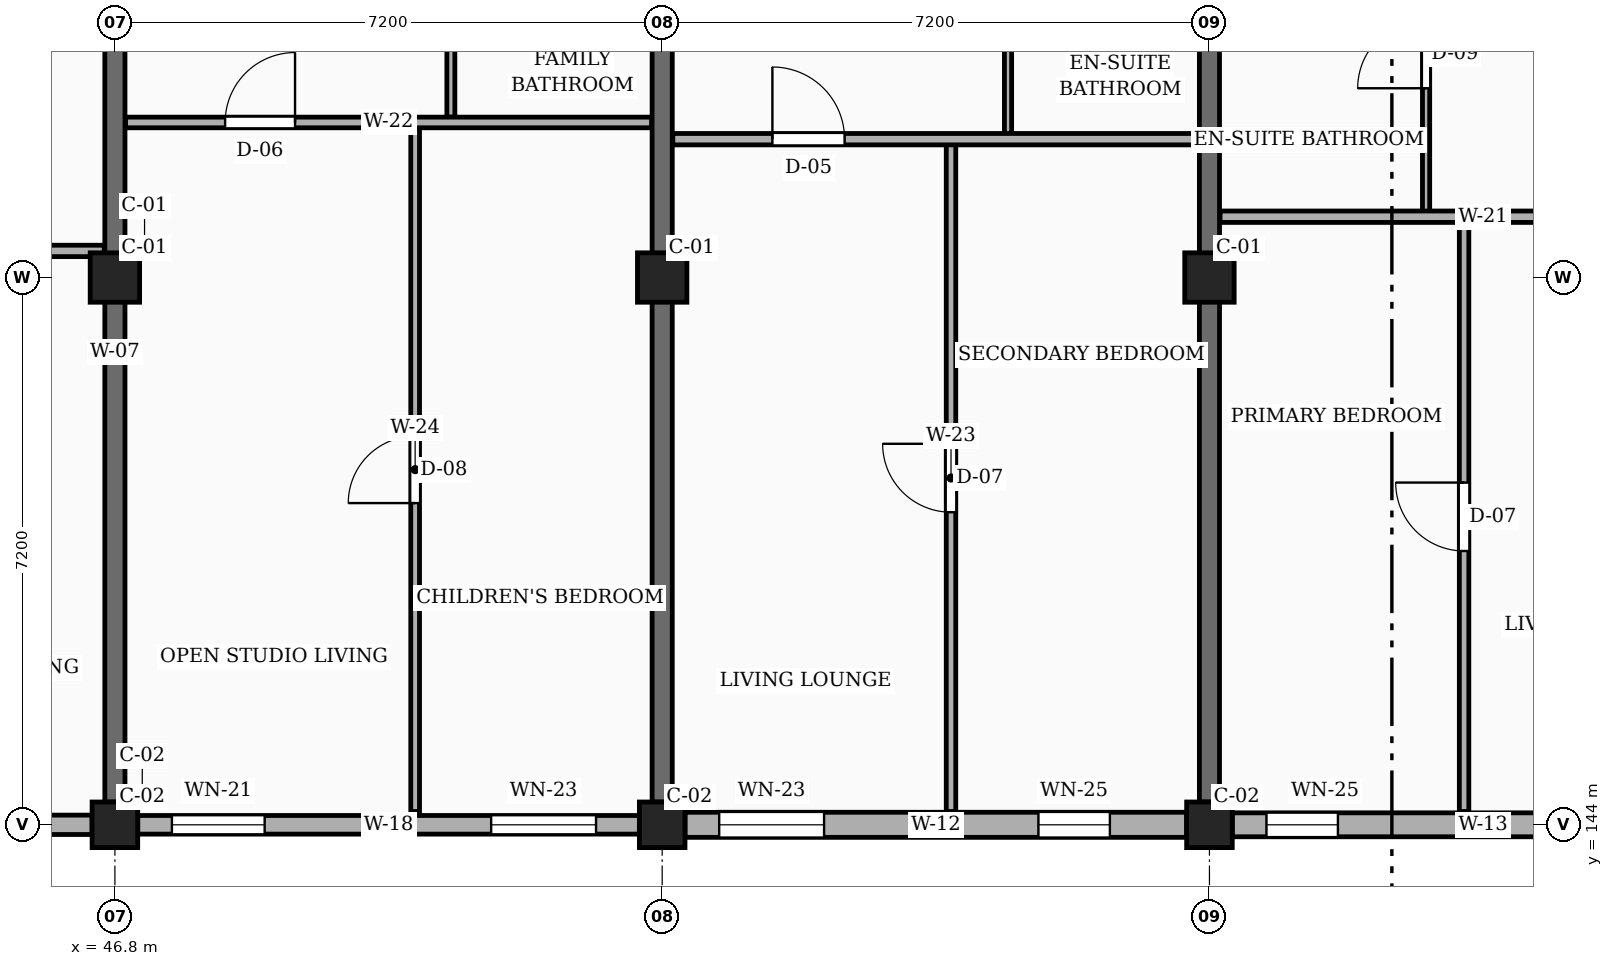
"""IFC4 building model, lengths in metres.
Left out: names, types, materials, properties, quantities, classifications, styles, units other than length and angle.
Written with IfcOpenShell. Run it as: python <this file> out.ifc"""

import sys

from ifc_helpers import new_model, si_unit, direction, frame, frame_2d, origin, origin_2d, place, context, subcontext, project, spatial, rectangle, extrude, element, fill, save


model = new_model("IFC4")
c1 = context("Model", 3, precision=1e-05, world=origin(), true_north=direction((0.0, 1.0)))
c2 = subcontext(c1, "Body", "Model", "MODEL_VIEW")
j1 = project(units=[si_unit("LENGTHUNIT", "METRE"), si_unit("PLANEANGLEUNIT", "RADIAN")], contexts=[c1])
p1 = place(None, origin())
s1 = spatial("IfcSite", under=j1, at=p1, CompositionType="ELEMENT")
p2 = place(p1, origin())
s2 = spatial("IfcBuilding", under=s1, at=p2, CompositionType="ELEMENT")
p3 = place(p2, frame((0.0, 0.0, 4.5)))
s3 = spatial("IfcBuildingStorey", under=s2, at=p3, CompositionType="ELEMENT", Elevation=4.5)
p4 = place(p3, frame((46.8, 144.0, 0.0), z_axis=(0.0, 0.0, 1.0), x_axis=(1.0, 0.0, 0.0)))
e1 = element("IfcColumn", 1, at=p4, inside=s3, PredefinedType="COLUMN", context=c2, shape_type="SweptSolid", body=[
    extrude(rectangle(XDim=0.6, YDim=0.6, at=origin_2d()), origin(), (0.0, 0.0, 1.0), 3.15),
])
p5 = place(p3, frame((46.8, 151.2, 0.0), z_axis=(0.0, 0.0, 1.0), x_axis=(1.0, 0.0, 0.0)))
e2 = element("IfcColumn", 2, at=p5, inside=s3, PredefinedType="COLUMN", context=c2, shape_type="SweptSolid", body=[
    extrude(rectangle(XDim=0.65, YDim=0.65, at=origin_2d()), origin(), (0.0, 0.0, 1.0), 3.15),
])
p6 = place(p3, frame((54.0, 144.0, 0.0), z_axis=(0.0, 0.0, 1.0), x_axis=(1.0, 0.0, 0.0)))
e3 = element("IfcColumn", 3, at=p6, inside=s3, PredefinedType="COLUMN", context=c2, shape_type="SweptSolid", body=[
    extrude(rectangle(XDim=0.6, YDim=0.6, at=origin_2d()), origin(), (0.0, 0.0, 1.0), 3.15),
])
p7 = place(p3, frame((54.0, 151.2, 0.0), z_axis=(0.0, 0.0, 1.0), x_axis=(1.0, 0.0, 0.0)))
e4 = element("IfcColumn", 4, at=p7, inside=s3, PredefinedType="COLUMN", context=c2, shape_type="SweptSolid", body=[
    extrude(rectangle(XDim=0.65, YDim=0.65, at=origin_2d()), origin(), (0.0, 0.0, 1.0), 3.15),
])
p8 = place(p3, frame((61.2, 144.0, 0.0), z_axis=(0.0, 0.0, 1.0), x_axis=(1.0, 0.0, 0.0)))
e5 = element("IfcColumn", 5, at=p8, inside=s3, PredefinedType="COLUMN", context=c2, shape_type="SweptSolid", body=[
    extrude(rectangle(XDim=0.6, YDim=0.6, at=origin_2d()), origin(), (0.0, 0.0, 1.0), 3.15),
])
p9 = place(p3, frame((61.2, 151.2, 0.0), z_axis=(0.0, 0.0, 1.0), x_axis=(1.0, 0.0, 0.0)))
e6 = element("IfcColumn", 6, at=p9, inside=s3, PredefinedType="COLUMN", context=c2, shape_type="SweptSolid", body=[
    extrude(rectangle(XDim=0.65, YDim=0.65, at=origin_2d()), origin(), (0.0, 0.0, 1.0), 3.15),
])
for number, where, z_axis, x_axis in (
    (7, (46.8, 144.3, 0.0), (0.0, 0.0, 1.0), (0.0, 1.0, 0.0)),
    (8, (54.0, 144.3, 0.0), (0.0, 0.0, 1.0), (0.0, 1.0, 0.0)),
    (9, (61.2, 144.3, 0.0), (0.0, 0.0, 1.0), (0.0, 1.0, 0.0)),
):
    element("IfcWall", number, at=place(p3, frame(where, z_axis=z_axis, x_axis=x_axis)), inside=s3, PredefinedType="SOLIDWALL", context=c2, shape_type="SweptSolid", body=[
        extrude(rectangle(XDim=11.85, YDim=0.265, at=frame_2d((5.925, 0.0))), origin(), (0.0, 0.0, 1.0), 2.185),
    ])
p10 = place(p3, frame((39.9, 144.0, 0.0), z_axis=(0.0, 0.0, 1.0), x_axis=(1.0, 0.0, 0.0)))
e10 = element("IfcWall", 10, at=p10, inside=s3, PredefinedType="SOLIDWALL", context=c2, shape_type="SweptSolid", body=[
    extrude(rectangle(XDim=6.6, YDim=0.255, at=frame_2d((3.3, 0.0))), origin(), (0.0, 0.0, 1.0), 2.455),
])
p11 = place(p10, frame((0.45, 0.0, 0.78)))
e11 = element("IfcOpeningElement", 11, at=p11, cuts=e10, PredefinedType="OPENING", context=c2, shape_type="SweptSolid", body=[
    extrude(rectangle(XDim=1.06, YDim=1.36, at=frame_2d((0.53, 0.68))), frame((0.0, 0.137, 0.0), z_axis=(0.0, -1.0, 0.0), x_axis=(1.0, 0.0, 0.0)), (0.0, 0.0, 1.0), 0.275),
])
p12 = place(p10, frame((4.65, 0.0, 0.78)))
e12 = element("IfcOpeningElement", 12, at=p12, cuts=e10, PredefinedType="OPENING", context=c2, shape_type="SweptSolid", body=[
    extrude(rectangle(XDim=1.22, YDim=1.36, at=frame_2d((0.61, 0.68))), frame((0.0, 0.137, 0.0), z_axis=(0.0, -1.0, 0.0), x_axis=(1.0, 0.0, 0.0)), (0.0, 0.0, 1.0), 0.275),
])
p13 = place(p3, frame((47.1, 144.0, 0.0), z_axis=(0.0, 0.0, 1.0), x_axis=(1.0, 0.0, 0.0)))
e13 = element("IfcWall", 13, at=p13, inside=s3, PredefinedType="SOLIDWALL", context=c2, shape_type="SweptSolid", body=[
    extrude(rectangle(XDim=6.6, YDim=0.245, at=frame_2d((3.3, 0.0))), origin(), (0.0, 0.0, 1.0), 2.455),
])
p14 = place(p13, frame((0.45, 0.0, 0.78)))
e14 = element("IfcOpeningElement", 14, at=p14, cuts=e13, PredefinedType="OPENING", context=c2, shape_type="SweptSolid", body=[
    extrude(rectangle(XDim=1.22, YDim=1.36, at=frame_2d((0.61, 0.68))), frame((0.0, 0.133, 0.0), z_axis=(0.0, -1.0, 0.0), x_axis=(1.0, 0.0, 0.0)), (0.0, 0.0, 1.0), 0.265),
])
p15 = place(p13, frame((4.65, 0.0, 0.78)))
e15 = element("IfcOpeningElement", 15, at=p15, cuts=e13, PredefinedType="OPENING", context=c2, shape_type="SweptSolid", body=[
    extrude(rectangle(XDim=1.38, YDim=1.36, at=frame_2d((0.69, 0.68))), frame((0.0, 0.133, 0.0), z_axis=(0.0, -1.0, 0.0), x_axis=(1.0, 0.0, 0.0)), (0.0, 0.0, 1.0), 0.265),
])
p16 = place(p3, frame((54.3, 144.0, 0.0), z_axis=(0.0, 0.0, 1.0), x_axis=(1.0, 0.0, 0.0)))
e16 = element("IfcWall", 16, at=p16, inside=s3, PredefinedType="SOLIDWALL", context=c2, shape_type="SweptSolid", body=[
    extrude(rectangle(XDim=6.6, YDim=0.33, at=frame_2d((3.3, 0.0))), origin(), (0.0, 0.0, 1.0), 2.455),
])
p17 = place(p16, frame((0.45, 0.0, 0.78)))
e17 = element("IfcOpeningElement", 17, at=p17, cuts=e16, PredefinedType="OPENING", context=c2, shape_type="SweptSolid", body=[
    extrude(rectangle(XDim=1.38, YDim=1.36, at=frame_2d((0.69, 0.68))), frame((0.0, 0.175, 0.0), z_axis=(0.0, -1.0, 0.0), x_axis=(1.0, 0.0, 0.0)), (0.0, 0.0, 1.0), 0.35),
])
p18 = place(p16, frame((4.65, 0.0, 0.78)))
e18 = element("IfcOpeningElement", 18, at=p18, cuts=e16, PredefinedType="OPENING", context=c2, shape_type="SweptSolid", body=[
    extrude(rectangle(XDim=0.94, YDim=1.44, at=frame_2d((0.47, 0.72))), frame((0.0, 0.175, 0.0), z_axis=(0.0, -1.0, 0.0), x_axis=(1.0, 0.0, 0.0)), (0.0, 0.0, 1.0), 0.35),
])
p19 = place(p3, frame((61.5, 144.0, 0.0), z_axis=(0.0, 0.0, 1.0), x_axis=(1.0, 0.0, 0.0)))
e19 = element("IfcWall", 19, at=p19, inside=s3, PredefinedType="SOLIDWALL", context=c2, shape_type="SweptSolid", body=[
    extrude(rectangle(XDim=6.6, YDim=0.315, at=frame_2d((3.3, 0.0))), origin(), (0.0, 0.0, 1.0), 2.455),
])
p20 = place(p19, frame((0.45, 0.0, 0.78)))
e20 = element("IfcOpeningElement", 20, at=p20, cuts=e19, PredefinedType="OPENING", context=c2, shape_type="SweptSolid", body=[
    extrude(rectangle(XDim=0.94, YDim=1.44, at=frame_2d((0.47, 0.72))), frame((0.0, 0.167, 0.0), z_axis=(0.0, -1.0, 0.0), x_axis=(1.0, 0.0, 0.0)), (0.0, 0.0, 1.0), 0.335),
])
p21 = place(p19, frame((4.65, 0.0, 0.78)))
e21 = element("IfcOpeningElement", 21, at=p21, cuts=e19, PredefinedType="OPENING", context=c2, shape_type="SweptSolid", body=[
    extrude(rectangle(XDim=1.15, YDim=1.44, at=frame_2d((0.575, 0.72))), frame((0.0, 0.167, 0.0), z_axis=(0.0, -1.0, 0.0), x_axis=(1.0, 0.0, 0.0)), (0.0, 0.0, 1.0), 0.335),
])
p22 = place(p3, frame((39.74, 151.55, 0.0), z_axis=(0.0, 0.0, 1.0), x_axis=(1.0, 0.0, 0.0)))
e22 = element("IfcWall", 22, at=p22, inside=s3, PredefinedType="PARTITIONING", context=c2, shape_type="SweptSolid", body=[
    extrude(rectangle(XDim=6.92, YDim=0.15, at=frame_2d((3.46, 0.0))), origin(), (0.0, 0.0, 1.0), 2.32),
])
p23 = place(p22, frame((4.66, 0.0, 0.0)))
e23 = element("IfcOpeningElement", 23, at=p23, cuts=e22, PredefinedType="OPENING", context=c2, shape_type="SweptSolid", body=[
    extrude(rectangle(XDim=0.95, YDim=2.1, at=frame_2d((0.475, 1.05))), frame((0.0, 0.085, 0.0), z_axis=(0.0, -1.0, 0.0), x_axis=(1.0, 0.0, 0.0)), (0.0, 0.0, 1.0), 0.17),
])
p24 = place(p3, frame((50.75, 144.175, 0.0), z_axis=(0.0, 0.0, 1.0), x_axis=(0.0, 1.0, 0.0)))
e24 = element("IfcWall", 24, at=p24, inside=s3, PredefinedType="PARTITIONING", context=c2, shape_type="SweptSolid", body=[
    extrude(rectangle(XDim=8.995, YDim=0.115, at=frame_2d((4.498, 0.0))), origin(), (0.0, 0.0, 1.0), 2.32),
])
p25 = place(p24, frame((4.058, 0.0, 0.0)))
e25 = element("IfcOpeningElement", 25, at=p25, cuts=e24, PredefinedType="OPENING", context=c2, shape_type="SweptSolid", body=[
    extrude(rectangle(XDim=0.88, YDim=2.08, at=frame_2d((0.44, 1.04))), frame((0.0, 0.067, 0.0), z_axis=(0.0, -1.0, 0.0), x_axis=(1.0, 0.0, 0.0)), (0.0, 0.0, 1.0), 0.135),
])
p26 = place(p3, frame((51.22, 153.31, 0.0), z_axis=(0.0, 0.0, 1.0), x_axis=(0.0, 1.0, 0.0)))
e26 = element("IfcWall", 26, at=p26, inside=s3, PredefinedType="PARTITIONING", context=c2, shape_type="SweptSolid", body=[
    extrude(rectangle(XDim=2.9, YDim=0.105, at=frame_2d((1.45, 0.0))), origin(), (0.0, 0.0, 1.0), 2.32),
])
p27 = place(p26, frame((1.015, 0.0, 0.0)))
e27 = element("IfcOpeningElement", 27, at=p27, cuts=e26, PredefinedType="OPENING", context=c2, shape_type="SweptSolid", body=[
    extrude(rectangle(XDim=0.87, YDim=2.05, at=frame_2d((0.435, 1.025))), frame((0.0, 0.062, 0.0), z_axis=(0.0, -1.0, 0.0), x_axis=(1.0, 0.0, 0.0)), (0.0, 0.0, 1.0), 0.125),
])
p28 = place(p3, frame((46.94, 153.24, 0.0), z_axis=(0.0, 0.0, 1.0), x_axis=(1.0, 0.0, 0.0)))
e28 = element("IfcWall", 28, at=p28, inside=s3, PredefinedType="PARTITIONING", context=c2, shape_type="SweptSolid", body=[
    extrude(rectangle(XDim=6.92, YDim=0.14, at=frame_2d((3.46, 0.0))), origin(), (0.0, 0.0, 1.0), 2.32),
])
p29 = place(p28, frame((1.31, 0.0, 0.0)))
e29 = element("IfcOpeningElement", 29, at=p29, cuts=e28, PredefinedType="OPENING", context=c2, shape_type="SweptSolid", body=[
    extrude(rectangle(XDim=0.92, YDim=2.1, at=frame_2d((0.46, 1.05))), frame((0.0, 0.08, 0.0), z_axis=(0.0, -1.0, 0.0), x_axis=(1.0, 0.0, 0.0)), (0.0, 0.0, 1.0), 0.16),
])
p30 = place(p3, frame((57.8, 144.175, 0.0), z_axis=(0.0, 0.0, 1.0), x_axis=(0.0, 1.0, 0.0)))
e30 = element("IfcWall", 30, at=p30, inside=s3, PredefinedType="PARTITIONING", context=c2, shape_type="SweptSolid", body=[
    extrude(rectangle(XDim=8.775, YDim=0.125, at=frame_2d((4.387, 0.0))), origin(), (0.0, 0.0, 1.0), 2.32),
])
p31 = place(p30, frame((3.938, 0.0, 0.0)))
e31 = element("IfcOpeningElement", 31, at=p31, cuts=e30, PredefinedType="OPENING", context=c2, shape_type="SweptSolid", body=[
    extrude(rectangle(XDim=0.9, YDim=2.1, at=frame_2d((0.45, 1.05))), frame((0.0, 0.073, 0.0), z_axis=(0.0, -1.0, 0.0), x_axis=(1.0, 0.0, 0.0)), (0.0, 0.0, 1.0), 0.145),
])
p32 = place(p3, frame((58.55, 153.09, 0.0), z_axis=(0.0, 0.0, 1.0), x_axis=(0.0, 1.0, 0.0)))
e32 = element("IfcWall", 32, at=p32, inside=s3, PredefinedType="PARTITIONING", context=c2, shape_type="SweptSolid", body=[
    extrude(rectangle(XDim=3.12, YDim=0.095, at=frame_2d((1.56, 0.0))), origin(), (0.0, 0.0, 1.0), 2.32),
])
p33 = place(p32, frame((1.11, 0.0, 0.0)))
e33 = element("IfcOpeningElement", 33, at=p33, cuts=e32, PredefinedType="OPENING", context=c2, shape_type="SweptSolid", body=[
    extrude(rectangle(XDim=0.9, YDim=2.05, at=frame_2d((0.45, 1.025))), frame((0.0, 0.058, 0.0), z_axis=(0.0, -1.0, 0.0), x_axis=(1.0, 0.0, 0.0)), (0.0, 0.0, 1.0), 0.115),
])
p34 = place(p3, frame((54.14, 153.02, 0.0), z_axis=(0.0, 0.0, 1.0), x_axis=(1.0, 0.0, 0.0)))
e34 = element("IfcWall", 34, at=p34, inside=s3, PredefinedType="PARTITIONING", context=c2, shape_type="SweptSolid", body=[
    extrude(rectangle(XDim=6.92, YDim=0.15, at=frame_2d((3.46, 0.0))), origin(), (0.0, 0.0, 1.0), 2.32),
])
p35 = place(p34, frame((1.31, 0.0, 0.0)))
e35 = element("IfcOpeningElement", 35, at=p35, cuts=e34, PredefinedType="OPENING", context=c2, shape_type="SweptSolid", body=[
    extrude(rectangle(XDim=0.95, YDim=2.1, at=frame_2d((0.475, 1.05))), frame((0.0, 0.085, 0.0), z_axis=(0.0, -1.0, 0.0), x_axis=(1.0, 0.0, 0.0)), (0.0, 0.0, 1.0), 0.17),
])
p36 = place(p3, frame((64.55, 144.175, 0.0), z_axis=(0.0, 0.0, 1.0), x_axis=(0.0, 1.0, 0.0)))
e36 = element("IfcWall", 36, at=p36, inside=s3, PredefinedType="PARTITIONING", context=c2, shape_type="SweptSolid", body=[
    extrude(rectangle(XDim=7.755, YDim=0.125, at=frame_2d((3.877, 0.0))), origin(), (0.0, 0.0, 1.0), 2.32),
])
p37 = place(p36, frame((3.427, 0.0, 0.0)))
e37 = element("IfcOpeningElement", 37, at=p37, cuts=e36, PredefinedType="OPENING", context=c2, shape_type="SweptSolid", body=[
    extrude(rectangle(XDim=0.9, YDim=2.1, at=frame_2d((0.45, 1.05))), frame((0.0, 0.073, 0.0), z_axis=(0.0, -1.0, 0.0), x_axis=(1.0, 0.0, 0.0)), (0.0, 0.0, 1.0), 0.145),
])
p38 = place(p3, frame((64.05, 152.07, 0.0), z_axis=(0.0, 0.0, 1.0), x_axis=(0.0, 1.0, 0.0)))
e38 = element("IfcWall", 38, at=p38, inside=s3, PredefinedType="PARTITIONING", context=c2, shape_type="SweptSolid", body=[
    extrude(rectangle(XDim=4.14, YDim=0.095, at=frame_2d((2.07, 0.0))), origin(), (0.0, 0.0, 1.0), 2.32),
])
p39 = place(p38, frame((1.62, 0.0, 0.0)))
e39 = element("IfcOpeningElement", 39, at=p39, cuts=e38, PredefinedType="OPENING", context=c2, shape_type="SweptSolid", body=[
    extrude(rectangle(XDim=0.9, YDim=2.05, at=frame_2d((0.45, 1.025))), frame((0.0, 0.058, 0.0), z_axis=(0.0, -1.0, 0.0), x_axis=(1.0, 0.0, 0.0)), (0.0, 0.0, 1.0), 0.115),
])
p40 = place(p3, frame((61.34, 152.0, 0.0), z_axis=(0.0, 0.0, 1.0), x_axis=(1.0, 0.0, 0.0)))
e40 = element("IfcWall", 40, at=p40, inside=s3, PredefinedType="PARTITIONING", context=c2, shape_type="SweptSolid", body=[
    extrude(rectangle(XDim=6.92, YDim=0.15, at=frame_2d((3.46, 0.0))), origin(), (0.0, 0.0, 1.0), 2.32),
])
p41 = place(p40, frame((4.66, 0.0, 0.0)))
e41 = element("IfcOpeningElement", 41, at=p41, cuts=e40, PredefinedType="OPENING", context=c2, shape_type="SweptSolid", body=[
    extrude(rectangle(XDim=0.95, YDim=2.1, at=frame_2d((0.475, 1.05))), frame((0.0, 0.085, 0.0), z_axis=(0.0, -1.0, 0.0), x_axis=(1.0, 0.0, 0.0)), (0.0, 0.0, 1.0), 0.17),
])
p42 = place(p14, origin())
e42 = element("IfcWindow", 42, at=p42, inside=s3, PartitioningType="SINGLE_PANEL", PredefinedType="WINDOW", context=c2, shape_type="SweptSolid", body=[
    extrude(rectangle(XDim=1.22, YDim=1.36, at=frame_2d((0.61, 0.68))), frame((0.0, 0.03, 0.0), z_axis=(0.0, -1.0, 0.0), x_axis=(1.0, 0.0, 0.0)), (0.0, 0.0, 1.0), 0.06),
])
fill(e14, e42)
p43 = place(p15, origin())
e43 = element("IfcWindow", 43, at=p43, inside=s3, PartitioningType="SINGLE_PANEL", PredefinedType="WINDOW", context=c2, shape_type="SweptSolid", body=[
    extrude(rectangle(XDim=1.38, YDim=1.36, at=frame_2d((0.69, 0.68))), frame((0.0, 0.03, 0.0), z_axis=(0.0, -1.0, 0.0), x_axis=(1.0, 0.0, 0.0)), (0.0, 0.0, 1.0), 0.06),
])
fill(e15, e43)
p44 = place(p17, origin())
e44 = element("IfcWindow", 44, at=p44, inside=s3, PartitioningType="SINGLE_PANEL", PredefinedType="WINDOW", context=c2, shape_type="SweptSolid", body=[
    extrude(rectangle(XDim=1.38, YDim=1.36, at=frame_2d((0.69, 0.68))), frame((0.0, 0.03, 0.0), z_axis=(0.0, -1.0, 0.0), x_axis=(1.0, 0.0, 0.0)), (0.0, 0.0, 1.0), 0.06),
])
fill(e17, e44)
p45 = place(p18, origin())
e45 = element("IfcWindow", 45, at=p45, inside=s3, PartitioningType="SINGLE_PANEL", PredefinedType="WINDOW", context=c2, shape_type="SweptSolid", body=[
    extrude(rectangle(XDim=0.94, YDim=1.44, at=frame_2d((0.47, 0.72))), frame((0.0, 0.03, 0.0), z_axis=(0.0, -1.0, 0.0), x_axis=(1.0, 0.0, 0.0)), (0.0, 0.0, 1.0), 0.06),
])
fill(e18, e45)
p46 = place(p20, origin())
e46 = element("IfcWindow", 46, at=p46, inside=s3, PartitioningType="SINGLE_PANEL", PredefinedType="WINDOW", context=c2, shape_type="SweptSolid", body=[
    extrude(rectangle(XDim=0.94, YDim=1.44, at=frame_2d((0.47, 0.72))), frame((0.0, 0.03, 0.0), z_axis=(0.0, -1.0, 0.0), x_axis=(1.0, 0.0, 0.0)), (0.0, 0.0, 1.0), 0.06),
])
fill(e20, e46)
p47 = place(p25, origin())
e47 = element("IfcDoor", 47, at=p47, inside=s3, OperationType="SINGLE_SWING_LEFT", PredefinedType="DOOR", context=c2, shape_type="SweptSolid", body=[
    extrude(rectangle(XDim=0.88, YDim=2.08, at=frame_2d((0.44, 1.04))), frame((0.0, 0.025, 0.0), z_axis=(0.0, -1.0, 0.0), x_axis=(1.0, 0.0, 0.0)), (0.0, 0.0, 1.0), 0.05),
])
fill(e25, e47)
p48 = place(p29, origin())
e48 = element("IfcDoor", 48, at=p48, inside=s3, OperationType="SINGLE_SWING_RIGHT", PredefinedType="DOOR", context=c2, shape_type="SweptSolid", body=[
    extrude(rectangle(XDim=0.92, YDim=2.1, at=frame_2d((0.46, 1.05))), frame((0.0, 0.025, 0.0), z_axis=(0.0, -1.0, 0.0), x_axis=(1.0, 0.0, 0.0)), (0.0, 0.0, 1.0), 0.05),
])
fill(e29, e48)
p49 = place(p31, origin())
e49 = element("IfcDoor", 49, at=p49, inside=s3, OperationType="SINGLE_SWING_RIGHT", PredefinedType="DOOR", context=c2, shape_type="SweptSolid", body=[
    extrude(rectangle(XDim=0.9, YDim=2.1, at=frame_2d((0.45, 1.05))), frame((0.0, 0.025, 0.0), z_axis=(0.0, -1.0, 0.0), x_axis=(1.0, 0.0, 0.0)), (0.0, 0.0, 1.0), 0.05),
])
fill(e31, e49)
p50 = place(p35, origin())
e50 = element("IfcDoor", 50, at=p50, inside=s3, OperationType="SINGLE_SWING_LEFT", PredefinedType="DOOR", context=c2, shape_type="SweptSolid", body=[
    extrude(rectangle(XDim=0.95, YDim=2.1, at=frame_2d((0.475, 1.05))), frame((0.0, 0.025, 0.0), z_axis=(0.0, -1.0, 0.0), x_axis=(1.0, 0.0, 0.0)), (0.0, 0.0, 1.0), 0.05),
])
fill(e35, e50)
p51 = place(p37, origin())
e51 = element("IfcDoor", 51, at=p51, inside=s3, OperationType="SINGLE_SWING_RIGHT", PredefinedType="DOOR", context=c2, shape_type="SweptSolid", body=[
    extrude(rectangle(XDim=0.9, YDim=2.1, at=frame_2d((0.45, 1.05))), frame((0.0, 0.025, 0.0), z_axis=(0.0, -1.0, 0.0), x_axis=(1.0, 0.0, 0.0)), (0.0, 0.0, 1.0), 0.05),
])
fill(e37, e51)
p52 = place(p39, origin())
e52 = element("IfcDoor", 52, at=p52, inside=s3, OperationType="SINGLE_SWING_LEFT", PredefinedType="DOOR", context=c2, shape_type="SweptSolid", body=[
    extrude(rectangle(XDim=0.9, YDim=2.05, at=frame_2d((0.45, 1.025))), frame((0.0, 0.025, 0.0), z_axis=(0.0, -1.0, 0.0), x_axis=(1.0, 0.0, 0.0)), (0.0, 0.0, 1.0), 0.05),
])
fill(e39, e52)
save(model, sys.argv[1])
